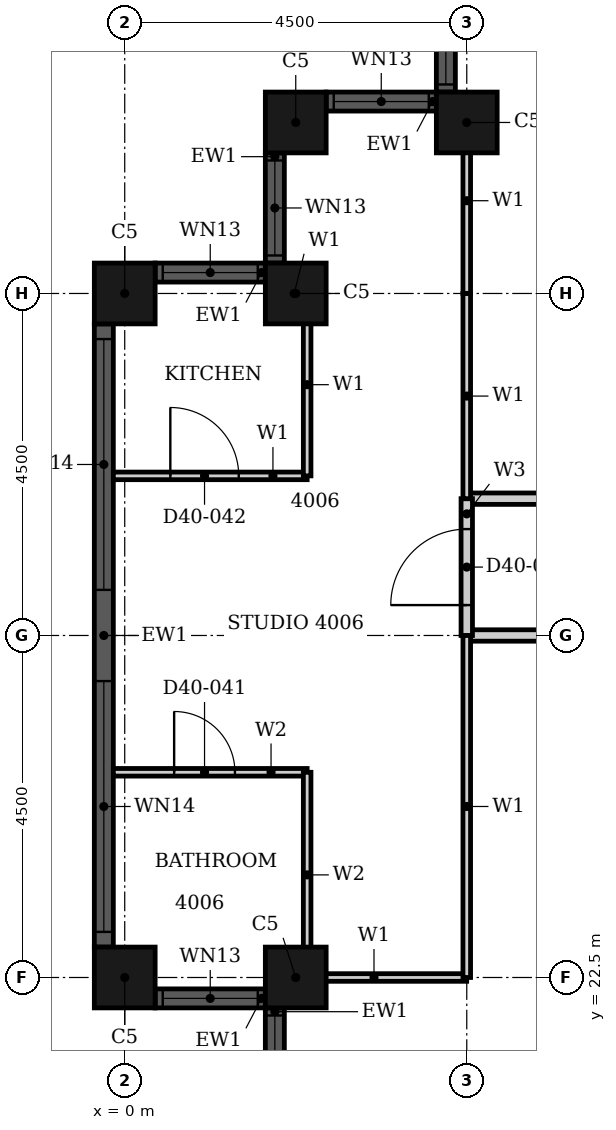
"""IFC4 building model, lengths in metres.
Left out: names, types, materials, properties, quantities, classifications, styles, units other than length and angle.
Written with IfcOpenShell. Run it as: python <this file> out.ifc"""

import sys

from ifc_helpers import new_model, si_unit, direction, frame, frame_2d, origin, origin_2d, place, context, subcontext, project, spatial, rectangle, hollow_rectangle, extrude, element, fill, save


model = new_model("IFC4")
c1 = context("Model", 3, precision=1e-05, world=origin(), true_north=direction((0.0, 1.0)))
c2 = subcontext(c1, "Body", "Model", "MODEL_VIEW")
j1 = project(units=[si_unit("LENGTHUNIT", "METRE"), si_unit("PLANEANGLEUNIT", "RADIAN")], contexts=[c1])
p1 = place(None, origin())
s1 = spatial("IfcSite", under=j1, at=p1, CompositionType="ELEMENT")
p2 = place(p1, origin())
s2 = spatial("IfcBuilding", under=s1, at=p2, CompositionType="ELEMENT")
p3 = place(p2, frame((0.0, 0.0, 161.7)))
s3 = spatial("IfcBuildingStorey", under=s2, at=p3, CompositionType="ELEMENT", Elevation=161.7)
for number, where, z_axis, x_axis in (
    (1, (4.5, 33.75, 0.0), (0.0, 0.0, 1.0), (1.0, 0.0, 0.0)),
    (2, (2.25, 33.75, 0.0), (0.0, 0.0, 1.0), (1.0, 0.0, 0.0)),
    (3, (2.25, 31.5, 0.0), (0.0, 0.0, 1.0), (1.0, 0.0, 0.0)),
    (4, (0.0, 31.5, 0.0), (0.0, 0.0, 1.0), (1.0, 0.0, 0.0)),
    (5, (0.0, 22.5, 0.0), (0.0, 0.0, 1.0), (1.0, 0.0, 0.0)),
    (6, (2.25, 22.5, 0.0), (0.0, 0.0, 1.0), (1.0, 0.0, 0.0)),
):
    element("IfcColumn", number, at=place(p3, frame(where, z_axis=z_axis, x_axis=x_axis)), inside=s3, PredefinedType="COLUMN", context=c2, shape_type="SweptSolid", body=[
        extrude(hollow_rectangle(XDim=0.8, YDim=0.8, WallThickness=0.025, at=origin_2d()), origin(), (0.0, 0.0, 1.0), 3.7),
    ])
p4 = place(p3, frame((4.225, 35.6, 0.0), z_axis=(0.0, 0.0, 1.0), x_axis=(0.0, -1.0, 0.0)))
e7 = element("IfcWall", 7, at=p4, inside=s3, PredefinedType="SOLIDWALL", context=c2, shape_type="SweptSolid", body=[
    extrude(rectangle(XDim=1.45, YDim=0.25, at=frame_2d((0.725, 0.0))), origin(), (0.0, 0.0, 1.0), 3.7),
])
p5 = place(p4, frame((0.1, 0.0, 0.9)))
e8 = element("IfcOpeningElement", 8, at=p5, cuts=e7, PredefinedType="OPENING", context=c2, shape_type="SweptSolid", body=[
    extrude(rectangle(XDim=1.25, YDim=2.08, at=frame_2d((0.625, 1.04))), frame((0.0, 0.135, 0.0), z_axis=(0.0, -1.0, 0.0), x_axis=(1.0, 0.0, 0.0)), (0.0, 0.0, 1.0), 0.27),
])
p6 = place(p3, frame((4.1, 34.025, 0.0), z_axis=(0.0, 0.0, 1.0), x_axis=(-1.0, 0.0, 0.0)))
e9 = element("IfcWall", 9, at=p6, inside=s3, PredefinedType="SOLIDWALL", context=c2, shape_type="SweptSolid", body=[
    extrude(rectangle(XDim=1.45, YDim=0.25, at=frame_2d((0.725, 0.0))), origin(), (0.0, 0.0, 1.0), 3.7),
])
p7 = place(p6, frame((0.1, 0.0, 0.9)))
e10 = element("IfcOpeningElement", 10, at=p7, cuts=e9, PredefinedType="OPENING", context=c2, shape_type="SweptSolid", body=[
    extrude(rectangle(XDim=1.25, YDim=1.85, at=frame_2d((0.625, 0.925))), frame((0.0, 0.135, 0.0), z_axis=(0.0, -1.0, 0.0), x_axis=(1.0, 0.0, 0.0)), (0.0, 0.0, 1.0), 0.27),
])
p8 = place(p3, frame((1.975, 33.35, 0.0), z_axis=(0.0, 0.0, 1.0), x_axis=(0.0, -1.0, 0.0)))
e11 = element("IfcWall", 11, at=p8, inside=s3, PredefinedType="SOLIDWALL", context=c2, shape_type="SweptSolid", body=[
    extrude(rectangle(XDim=1.45, YDim=0.25, at=frame_2d((0.725, 0.0))), origin(), (0.0, 0.0, 1.0), 3.7),
])
p9 = place(p8, frame((0.1, 0.0, 0.9)))
e12 = element("IfcOpeningElement", 12, at=p9, cuts=e11, PredefinedType="OPENING", context=c2, shape_type="SweptSolid", body=[
    extrude(rectangle(XDim=1.25, YDim=1.85, at=frame_2d((0.625, 0.925))), frame((0.0, 0.135, 0.0), z_axis=(0.0, -1.0, 0.0), x_axis=(1.0, 0.0, 0.0)), (0.0, 0.0, 1.0), 0.27),
])
p10 = place(p3, frame((1.85, 31.775, 0.0), z_axis=(0.0, 0.0, 1.0), x_axis=(-1.0, 0.0, 0.0)))
e13 = element("IfcWall", 13, at=p10, inside=s3, PredefinedType="SOLIDWALL", context=c2, shape_type="SweptSolid", body=[
    extrude(rectangle(XDim=1.45, YDim=0.25, at=frame_2d((0.725, 0.0))), origin(), (0.0, 0.0, 1.0), 3.7),
])
p11 = place(p10, frame((0.1, 0.0, 0.9)))
e14 = element("IfcOpeningElement", 14, at=p11, cuts=e13, PredefinedType="OPENING", context=c2, shape_type="SweptSolid", body=[
    extrude(rectangle(XDim=1.25, YDim=1.85, at=frame_2d((0.625, 0.925))), frame((0.0, 0.135, 0.0), z_axis=(0.0, -1.0, 0.0), x_axis=(1.0, 0.0, 0.0)), (0.0, 0.0, 1.0), 0.27),
])
p12 = place(p3, frame((-0.275, 31.1, 0.0), z_axis=(0.0, 0.0, 1.0), x_axis=(0.0, -1.0, 0.0)))
e15 = element("IfcWall", 15, at=p12, inside=s3, PredefinedType="SOLIDWALL", context=c2, shape_type="SweptSolid", body=[
    extrude(rectangle(XDim=8.2, YDim=0.25, at=frame_2d((4.1, 0.0))), origin(), (0.0, 0.0, 1.0), 3.7),
])
p13 = place(p12, frame((0.2, 0.0, 0.45)))
e16 = element("IfcOpeningElement", 16, at=p13, cuts=e15, PredefinedType="OPENING", context=c2, shape_type="SweptSolid", body=[
    extrude(rectangle(XDim=3.3, YDim=2.53, at=frame_2d((1.65, 1.265))), frame((0.0, 0.135, 0.0), z_axis=(0.0, -1.0, 0.0), x_axis=(1.0, 0.0, 0.0)), (0.0, 0.0, 1.0), 0.27),
])
p14 = place(p12, frame((4.7, 0.0, 0.45)))
e17 = element("IfcOpeningElement", 17, at=p14, cuts=e15, PredefinedType="OPENING", context=c2, shape_type="SweptSolid", body=[
    extrude(rectangle(XDim=3.3, YDim=2.53, at=frame_2d((1.65, 1.265))), frame((0.0, 0.135, 0.0), z_axis=(0.0, -1.0, 0.0), x_axis=(1.0, 0.0, 0.0)), (0.0, 0.0, 1.0), 0.27),
])
p15 = place(p3, frame((0.4, 22.225, 0.0), z_axis=(0.0, 0.0, 1.0), x_axis=(1.0, 0.0, 0.0)))
e18 = element("IfcWall", 18, at=p15, inside=s3, PredefinedType="SOLIDWALL", context=c2, shape_type="SweptSolid", body=[
    extrude(rectangle(XDim=1.45, YDim=0.25, at=frame_2d((0.725, 0.0))), origin(), (0.0, 0.0, 1.0), 3.7),
])
p16 = place(p15, frame((0.1, 0.0, 0.9)))
e19 = element("IfcOpeningElement", 19, at=p16, cuts=e18, PredefinedType="OPENING", context=c2, shape_type="SweptSolid", body=[
    extrude(rectangle(XDim=1.25, YDim=1.85, at=frame_2d((0.625, 0.925))), frame((0.0, 0.135, 0.0), z_axis=(0.0, -1.0, 0.0), x_axis=(1.0, 0.0, 0.0)), (0.0, 0.0, 1.0), 0.27),
])
p17 = place(p3, frame((1.975, 22.1, 0.0), z_axis=(0.0, 0.0, 1.0), x_axis=(0.0, -1.0, 0.0)))
e20 = element("IfcWall", 20, at=p17, inside=s3, PredefinedType="SOLIDWALL", context=c2, shape_type="SweptSolid", body=[
    extrude(rectangle(XDim=1.45, YDim=0.25, at=frame_2d((0.725, 0.0))), origin(), (0.0, 0.0, 1.0), 3.7),
])
p18 = place(p17, frame((0.1, 0.0, 0.9)))
e21 = element("IfcOpeningElement", 21, at=p18, cuts=e20, PredefinedType="OPENING", context=c2, shape_type="SweptSolid", body=[
    extrude(rectangle(XDim=1.25, YDim=1.85, at=frame_2d((0.625, 0.925))), frame((0.0, 0.135, 0.0), z_axis=(0.0, -1.0, 0.0), x_axis=(1.0, 0.0, 0.0)), (0.0, 0.0, 1.0), 0.27),
])
p19 = place(p3, frame((4.5, 27.0, 0.0), z_axis=(0.0, 0.0, 1.0), x_axis=(1.0, 0.0, 0.0)))
e22 = element("IfcWall", 22, at=p19, inside=s3, PredefinedType="PARTITIONING", context=c2, shape_type="SweptSolid", body=[
    extrude(rectangle(XDim=13.5, YDim=0.15, at=frame_2d((6.75, 0.0))), origin(), (0.0, 0.0, 1.0), 2.68),
])
p20 = place(p19, frame((5.35, 0.0, 0.0)))
e23 = element("IfcOpeningElement", 23, at=p20, cuts=e22, PredefinedType="OPENING", context=c2, shape_type="SweptSolid", body=[
    extrude(rectangle(XDim=1.0, YDim=2.1, at=frame_2d((0.5, 1.05))), frame((0.0, 0.085, 0.0), z_axis=(0.0, -1.0, 0.0), x_axis=(1.0, 0.0, 0.0)), (0.0, 0.0, 1.0), 0.17),
])
p21 = place(p3, frame((4.5, 28.8, 0.0), z_axis=(0.0, 0.0, 1.0), x_axis=(1.0, 0.0, 0.0)))
e24 = element("IfcWall", 24, at=p21, inside=s3, PredefinedType="PARTITIONING", context=c2, shape_type="SweptSolid", body=[
    extrude(rectangle(XDim=11.699, YDim=0.15, at=frame_2d((5.85, 0.0))), origin(), (0.0, 0.0, 1.0), 3.4),
])
p22 = place(p21, frame((4.0, 0.0, 0.0)))
e25 = element("IfcOpeningElement", 25, at=p22, cuts=e24, PredefinedType="OPENING", context=c2, shape_type="SweptSolid", body=[
    extrude(rectangle(XDim=1.0, YDim=2.1, at=frame_2d((0.5, 1.05))), frame((0.0, 0.085, 0.0), z_axis=(0.0, -1.0, 0.0), x_axis=(1.0, 0.0, 0.0)), (0.0, 0.0, 1.0), 0.17),
])
p23 = place(p3, frame((4.5, 27.0, 0.0), z_axis=(0.0, 0.0, 1.0), x_axis=(0.0, 1.0, 0.0)))
e26 = element("IfcWall", 26, at=p23, inside=s3, PredefinedType="PARTITIONING", context=c2, shape_type="SweptSolid", body=[
    extrude(rectangle(XDim=1.8, YDim=0.15, at=frame_2d((0.9, 0.0))), origin(), (0.0, 0.0, 1.0), 3.4),
])
p24 = place(p23, frame((0.4, 0.0, 0.0)))
e27 = element("IfcOpeningElement", 27, at=p24, cuts=e26, PredefinedType="OPENING", context=c2, shape_type="SweptSolid", body=[
    extrude(rectangle(XDim=1.0, YDim=2.2, at=frame_2d((0.5, 1.1))), frame((0.0, 0.085, 0.0), z_axis=(0.0, -1.0, 0.0), x_axis=(1.0, 0.0, 0.0)), (0.0, 0.0, 1.0), 0.17),
])
p25 = place(p3, frame((2.06, 22.5, 0.0), z_axis=(0.0, 0.0, 1.0), x_axis=(1.0, 0.0, 0.0)))
e28 = element("IfcWall", 28, at=p25, inside=s3, PredefinedType="PARTITIONING", context=c2, shape_type="SweptSolid", body=[
    extrude(rectangle(XDim=2.439, YDim=0.1, at=frame_2d((1.219, 0.0))), origin(), (0.0, 0.0, 1.0), 2.68),
])
p26 = place(p3, frame((-0.15, 29.1, 0.0), z_axis=(0.0, 0.0, 1.0), x_axis=(1.0, 0.0, 0.0)))
e29 = element("IfcWall", 29, at=p26, inside=s3, PredefinedType="PARTITIONING", context=c2, shape_type="SweptSolid", body=[
    extrude(rectangle(XDim=2.55, YDim=0.1, at=frame_2d((1.275, 0.0))), origin(), (0.0, 0.0, 1.0), 3.4),
])
p27 = place(p26, frame((0.75, 0.0, 0.0)))
e30 = element("IfcOpeningElement", 30, at=p27, cuts=e29, PredefinedType="OPENING", context=c2, shape_type="SweptSolid", body=[
    extrude(rectangle(XDim=0.9, YDim=2.1, at=frame_2d((0.45, 1.05))), frame((0.0, 0.06, 0.0), z_axis=(0.0, -1.0, 0.0), x_axis=(1.0, 0.0, 0.0)), (0.0, 0.0, 1.0), 0.12),
])
p28 = place(p3, frame((2.06, 31.5, 0.0), z_axis=(0.0, 0.0, 1.0), x_axis=(1.0, 0.0, 0.0)))
e31 = element("IfcWall", 31, at=p28, inside=s3, PredefinedType="PARTITIONING", context=c2, shape_type="SweptSolid", body=[
    extrude(rectangle(XDim=0.34, YDim=0.1, at=frame_2d((0.17, 0.0))), origin(), (0.0, 0.0, 1.0), 3.4),
])
p29 = place(p3, frame((2.4, 29.1, 0.0), z_axis=(0.0, 0.0, 1.0), x_axis=(0.0, 1.0, 0.0)))
e32 = element("IfcWall", 32, at=p29, inside=s3, PredefinedType="PARTITIONING", context=c2, shape_type="SweptSolid", body=[
    extrude(rectangle(XDim=2.4, YDim=0.1, at=frame_2d((1.2, 0.0))), origin(), (0.0, 0.0, 1.0), 3.4),
])
p30 = place(p3, frame((4.5, 28.8, 0.0), z_axis=(0.0, 0.0, 1.0), x_axis=(0.0, 1.0, 0.0)))
e33 = element("IfcWall", 33, at=p30, inside=s3, PredefinedType="PARTITIONING", context=c2, shape_type="SweptSolid", body=[
    extrude(rectangle(XDim=2.7, YDim=0.1, at=frame_2d((1.35, 0.0))), origin(), (0.0, 0.0, 1.0), 3.4),
])
p31 = place(p3, frame((4.5, 31.501, 0.0), z_axis=(0.0, 0.0, 1.0), x_axis=(0.0, 1.0, 0.0)))
e34 = element("IfcWall", 34, at=p31, inside=s3, PredefinedType="PARTITIONING", context=c2, shape_type="SweptSolid", body=[
    extrude(rectangle(XDim=2.439, YDim=0.1, at=frame_2d((1.219, 0.0))), origin(), (0.0, 0.0, 1.0), 3.4),
])
p32 = place(p3, frame((4.5, 22.5, 0.0), z_axis=(0.0, 0.0, 1.0), x_axis=(0.0, 1.0, 0.0)))
e35 = element("IfcWall", 35, at=p32, inside=s3, PredefinedType="PARTITIONING", context=c2, shape_type="SweptSolid", body=[
    extrude(rectangle(XDim=4.5, YDim=0.1, at=frame_2d((2.25, 0.0))), origin(), (0.0, 0.0, 1.0), 3.4),
])
p33 = place(p3, frame((-0.15, 25.2, 0.0), z_axis=(0.0, 0.0, 1.0), x_axis=(1.0, 0.0, 0.0)))
e36 = element("IfcWall", 36, at=p33, inside=s3, PredefinedType="PARTITIONING", context=c2, shape_type="SweptSolid", body=[
    extrude(rectangle(XDim=2.55, YDim=0.1, at=frame_2d((1.275, 0.0))), origin(), (0.0, 0.0, 1.0), 3.4),
])
p34 = place(p33, frame((0.8, 0.0, 0.0)))
e37 = element("IfcOpeningElement", 37, at=p34, cuts=e36, PredefinedType="OPENING", context=c2, shape_type="SweptSolid", body=[
    extrude(rectangle(XDim=0.8, YDim=2.1, at=frame_2d((0.4, 1.05))), frame((0.0, 0.06, 0.0), z_axis=(0.0, -1.0, 0.0), x_axis=(1.0, 0.0, 0.0)), (0.0, 0.0, 1.0), 0.12),
])
p35 = place(p3, frame((2.4, 22.5, 0.0), z_axis=(0.0, 0.0, 1.0), x_axis=(0.0, 1.0, 0.0)))
e38 = element("IfcWall", 38, at=p35, inside=s3, PredefinedType="PARTITIONING", context=c2, shape_type="SweptSolid", body=[
    extrude(rectangle(XDim=2.7, YDim=0.1, at=frame_2d((1.35, 0.0))), origin(), (0.0, 0.0, 1.0), 3.4),
])
p36 = place(p5, origin())
e39 = element("IfcWindow", 39, at=p36, inside=s3, PartitioningType="SINGLE_PANEL", PredefinedType="WINDOW", context=c2, shape_type="SweptSolid", body=[
    extrude(rectangle(XDim=1.25, YDim=2.08, at=frame_2d((0.625, 1.04))), frame((0.0, 0.03, 0.0), z_axis=(0.0, -1.0, 0.0), x_axis=(1.0, 0.0, 0.0)), (0.0, 0.0, 1.0), 0.06),
])
fill(e8, e39)
p37 = place(p7, origin())
e40 = element("IfcWindow", 40, at=p37, inside=s3, PartitioningType="SINGLE_PANEL", PredefinedType="WINDOW", context=c2, shape_type="SweptSolid", body=[
    extrude(rectangle(XDim=1.25, YDim=1.85, at=frame_2d((0.625, 0.925))), frame((0.0, 0.03, 0.0), z_axis=(0.0, -1.0, 0.0), x_axis=(1.0, 0.0, 0.0)), (0.0, 0.0, 1.0), 0.06),
])
fill(e10, e40)
p38 = place(p9, origin())
e41 = element("IfcWindow", 41, at=p38, inside=s3, PartitioningType="SINGLE_PANEL", PredefinedType="WINDOW", context=c2, shape_type="SweptSolid", body=[
    extrude(rectangle(XDim=1.25, YDim=1.85, at=frame_2d((0.625, 0.925))), frame((0.0, 0.03, 0.0), z_axis=(0.0, -1.0, 0.0), x_axis=(1.0, 0.0, 0.0)), (0.0, 0.0, 1.0), 0.06),
])
fill(e12, e41)
p39 = place(p11, origin())
e42 = element("IfcWindow", 42, at=p39, inside=s3, PartitioningType="SINGLE_PANEL", PredefinedType="WINDOW", context=c2, shape_type="SweptSolid", body=[
    extrude(rectangle(XDim=1.25, YDim=1.85, at=frame_2d((0.625, 0.925))), frame((0.0, 0.03, 0.0), z_axis=(0.0, -1.0, 0.0), x_axis=(1.0, 0.0, 0.0)), (0.0, 0.0, 1.0), 0.06),
])
fill(e14, e42)
p40 = place(p13, origin())
e43 = element("IfcWindow", 43, at=p40, inside=s3, PartitioningType="SINGLE_PANEL", PredefinedType="WINDOW", context=c2, shape_type="SweptSolid", body=[
    extrude(rectangle(XDim=3.3, YDim=2.53, at=frame_2d((1.65, 1.265))), frame((0.0, 0.03, 0.0), z_axis=(0.0, -1.0, 0.0), x_axis=(1.0, 0.0, 0.0)), (0.0, 0.0, 1.0), 0.06),
])
fill(e16, e43)
p41 = place(p14, origin())
e44 = element("IfcWindow", 44, at=p41, inside=s3, PartitioningType="SINGLE_PANEL", PredefinedType="WINDOW", context=c2, shape_type="SweptSolid", body=[
    extrude(rectangle(XDim=3.3, YDim=2.53, at=frame_2d((1.65, 1.265))), frame((0.0, 0.03, 0.0), z_axis=(0.0, -1.0, 0.0), x_axis=(1.0, 0.0, 0.0)), (0.0, 0.0, 1.0), 0.06),
])
fill(e17, e44)
p42 = place(p16, origin())
e45 = element("IfcWindow", 45, at=p42, inside=s3, PartitioningType="SINGLE_PANEL", PredefinedType="WINDOW", context=c2, shape_type="SweptSolid", body=[
    extrude(rectangle(XDim=1.25, YDim=1.85, at=frame_2d((0.625, 0.925))), frame((0.0, 0.03, 0.0), z_axis=(0.0, -1.0, 0.0), x_axis=(1.0, 0.0, 0.0)), (0.0, 0.0, 1.0), 0.06),
])
fill(e19, e45)
p43 = place(p18, origin())
e46 = element("IfcWindow", 46, at=p43, inside=s3, PartitioningType="SINGLE_PANEL", PredefinedType="WINDOW", context=c2, shape_type="SweptSolid", body=[
    extrude(rectangle(XDim=1.25, YDim=1.85, at=frame_2d((0.625, 0.925))), frame((0.0, 0.03, 0.0), z_axis=(0.0, -1.0, 0.0), x_axis=(1.0, 0.0, 0.0)), (0.0, 0.0, 1.0), 0.06),
])
fill(e21, e46)
p44 = place(p24, origin())
e47 = element("IfcDoor", 47, at=p44, inside=s3, OperationType="SINGLE_SWING_RIGHT", PredefinedType="DOOR", context=c2, shape_type="SweptSolid", body=[
    extrude(rectangle(XDim=1.0, YDim=2.2, at=frame_2d((0.5, 1.1))), frame((0.0, 0.025, 0.0), z_axis=(0.0, -1.0, 0.0), x_axis=(1.0, 0.0, 0.0)), (0.0, 0.0, 1.0), 0.05),
])
fill(e27, e47)
p45 = place(p34, origin())
e48 = element("IfcDoor", 48, at=p45, inside=s3, OperationType="SINGLE_SWING_RIGHT", PredefinedType="DOOR", context=c2, shape_type="SweptSolid", body=[
    extrude(rectangle(XDim=0.8, YDim=2.1, at=frame_2d((0.4, 1.05))), frame((0.0, 0.025, 0.0), z_axis=(0.0, -1.0, 0.0), x_axis=(1.0, 0.0, 0.0)), (0.0, 0.0, 1.0), 0.05),
])
fill(e37, e48)
p46 = place(p27, origin())
e49 = element("IfcDoor", 49, at=p46, inside=s3, OperationType="SINGLE_SWING_RIGHT", PredefinedType="DOOR", context=c2, shape_type="SweptSolid", body=[
    extrude(rectangle(XDim=0.9, YDim=2.1, at=frame_2d((0.45, 1.05))), frame((0.0, 0.025, 0.0), z_axis=(0.0, -1.0, 0.0), x_axis=(1.0, 0.0, 0.0)), (0.0, 0.0, 1.0), 0.05),
])
fill(e30, e49)
save(model, sys.argv[1])
